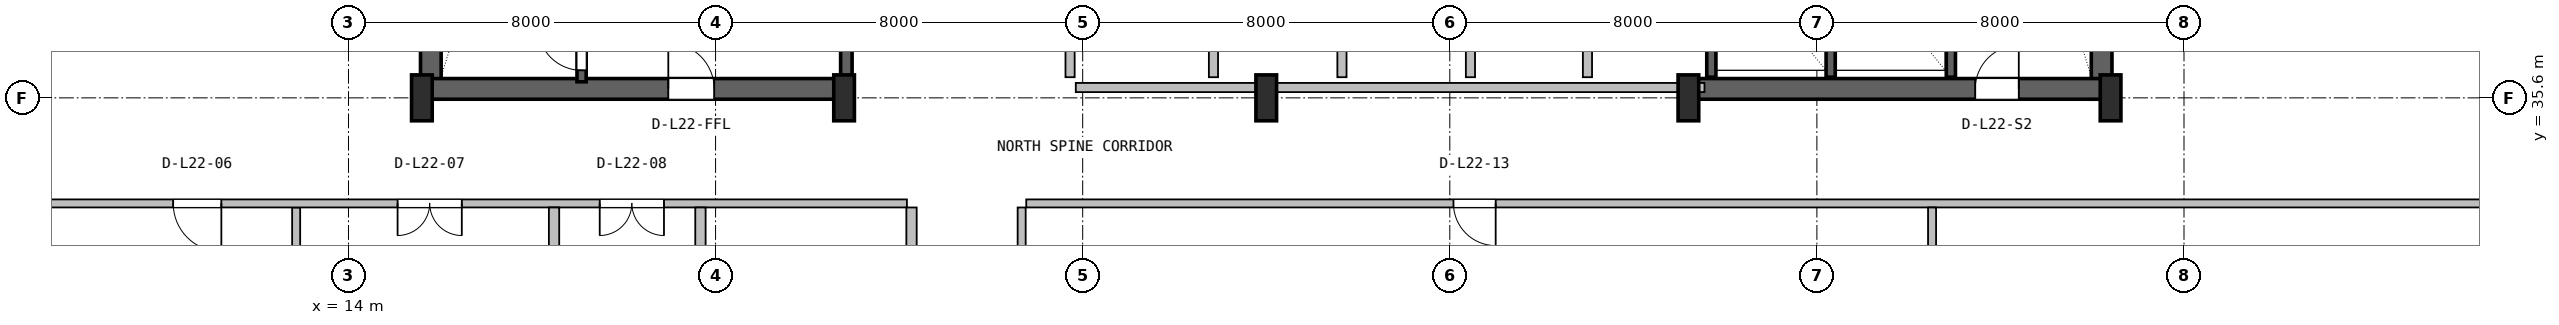
"""IFC4 building model, lengths in metres.
Left out: names, types, materials, properties, quantities, classifications, styles, units other than length and angle.
Written with IfcOpenShell. Run it as: python <this file> out.ifc"""

import sys

from ifc_helpers import new_model, si_unit, direction, frame, frame_2d, origin, origin_2d, place, context, subcontext, project, spatial, rectangle, i_section, extrude, source, transform, mapped, element, fill, save


model = new_model("IFC4")
c1 = context("Model", 3, precision=1e-05, world=origin(), true_north=direction((0.0, 1.0)))
c2 = subcontext(c1, "Body", "Model", "MODEL_VIEW")
j1 = project(units=[si_unit("LENGTHUNIT", "METRE"), si_unit("PLANEANGLEUNIT", "RADIAN")], contexts=[c1])
p1 = place(None, origin())
s1 = spatial("IfcSite", under=j1, at=p1, CompositionType="ELEMENT")
p2 = place(p1, origin())
s2 = spatial("IfcBuilding", under=s1, at=p2, CompositionType="ELEMENT")
p3 = place(p2, frame((0.0, 0.0, 94.6)))
s3 = spatial("IfcBuildingStorey", under=s2, at=p3, CompositionType="ELEMENT", Elevation=94.6)
for number, where, z_axis, x_axis in (
    (1, (15.795, 35.57, 0.0), (0.0, 0.0, 1.0), (0.0, 1.0, 0.0)),
    (2, (52.205, 35.57, 0.0), (0.0, 0.0, 1.0), (0.0, 1.0, 0.0)),
):
    element("IfcWall", number, at=place(p3, frame(where, z_axis=z_axis, x_axis=x_axis)), inside=s3, PredefinedType="SHEAR", context=c2, shape_type="SweptSolid", body=[
        extrude(rectangle(XDim=11.23, YDim=0.45, at=frame_2d((5.615, 0.0))), origin(), (0.0, 0.0, 1.0), 3.52),
    ])
p4 = place(p3, frame((15.57, 35.795, 0.0), z_axis=(0.0, 0.0, 1.0), x_axis=(1.0, 0.0, 0.0)))
e3 = element("IfcWall", 3, at=p4, inside=s3, PredefinedType="SHEAR", context=c2, shape_type="SweptSolid", body=[
    extrude(rectangle(XDim=9.23, YDim=0.45, at=frame_2d((4.615, 0.0))), origin(), (0.0, 0.0, 1.0), 3.52),
])
p5 = place(p4, frame((5.4, 0.0, 0.0)))
e4 = element("IfcOpeningElement", 4, at=p5, cuts=e3, PredefinedType="OPENING", context=c2, shape_type="SweptSolid", body=[
    extrude(rectangle(XDim=1.0, YDim=2.1, at=frame_2d((0.5, 1.05))), frame((0.0, 0.235, 0.0), z_axis=(0.0, -1.0, 0.0), x_axis=(1.0, 0.0, 0.0)), (0.0, 0.0, 1.0), 0.47),
])
p6 = place(p3, frame((43.2, 35.795, 0.0), z_axis=(0.0, 0.0, 1.0), x_axis=(1.0, 0.0, 0.0)))
e5 = element("IfcWall", 5, at=p6, inside=s3, PredefinedType="SHEAR", context=c2, shape_type="SweptSolid", body=[
    extrude(rectangle(XDim=9.23, YDim=0.45, at=frame_2d((4.615, 0.0))), origin(), (0.0, 0.0, 1.0), 3.52),
])
p7 = place(p6, frame((6.25, 0.0, 0.0)))
e6 = element("IfcOpeningElement", 6, at=p7, cuts=e5, PredefinedType="OPENING", context=c2, shape_type="SweptSolid", body=[
    extrude(rectangle(XDim=0.95, YDim=2.1, at=frame_2d((0.475, 1.05))), frame((0.0, 0.235, 0.0), z_axis=(0.0, -1.0, 0.0), x_axis=(1.0, 0.0, 0.0)), (0.0, 0.0, 1.0), 0.47),
])
m1 = source(origin(), c2, "Body", "SweptSolid", [
    extrude(i_section(OverallWidth=0.45, OverallDepth=1.0, WebThickness=0.016, FlangeThickness=0.03, FilletRadius=0.016, at=origin_2d()), origin(), (0.0, 0.0, 1.0), 3.8),
])
for number, where, z_axis, x_axis in (
    (7, (15.6, 35.6, 0.0), (0.0, 0.0, 1.0), (1.0, 0.0, 0.0)),
    (8, (24.8, 35.6, 0.0), (0.0, 0.0, 1.0), (1.0, 0.0, 0.0)),
    (9, (34.0, 35.6, 0.0), (0.0, 0.0, 1.0), (1.0, 0.0, 0.0)),
    (10, (43.2, 35.6, 0.0), (0.0, 0.0, 1.0), (1.0, 0.0, 0.0)),
    (11, (52.4, 35.6, 0.0), (0.0, 0.0, 1.0), (1.0, 0.0, 0.0)),
):
    element("IfcColumn", number, at=place(p3, frame(where, z_axis=z_axis, x_axis=x_axis)), inside=s3, PredefinedType="COLUMN", context=c2, shape_type="MappedRepresentation", body=[
        mapped(m1, transform((0.0, 0.0, 0.0), x_axis=(1.0, 0.0, 0.0), y_axis=(0.0, 1.0, 0.0), z_axis=(0.0, 0.0, 1.0), scale=1.0)),
    ])
p8 = place(p3, frame((19.08, 35.95, 0.0), z_axis=(0.0, 0.0, 1.0), x_axis=(0.0, 1.0, 0.0)))
e12 = element("IfcWall", 12, at=p8, inside=s3, PredefinedType="SHEAR", context=c2, shape_type="SweptSolid", body=[
    extrude(rectangle(XDim=9.65, YDim=0.2, at=frame_2d((4.825, 0.0))), origin(), (0.0, 0.0, 1.0), 3.52),
])
p9 = place(p8, frame((0.25, 0.0, 0.0)))
e13 = element("IfcOpeningElement", 13, at=p9, cuts=e12, PredefinedType="OPENING", context=c2, shape_type="SweptSolid", body=[
    extrude(rectangle(XDim=0.95, YDim=2.1, at=frame_2d((0.475, 1.05))), frame((0.0, 0.11, 0.0), z_axis=(0.0, -1.0, 0.0), x_axis=(1.0, 0.0, 0.0)), (0.0, 0.0, 1.0), 0.22),
])
p10 = place(p3, frame((24.85, 36.05, 0.0), z_axis=(0.0, 0.0, 1.0), x_axis=(0.0, 1.0, 0.0)))
e14 = element("IfcWall", 14, at=p10, inside=s3, PredefinedType="SHEAR", context=c2, shape_type="SweptSolid", body=[
    extrude(rectangle(XDim=10.45, YDim=0.25, at=frame_2d((5.225, 0.0))), origin(), (0.0, 0.0, 1.0), 3.52),
])
p11 = place(p3, frame((48.92, 36.05, 0.0), z_axis=(0.0, 0.0, 1.0), x_axis=(0.0, 1.0, 0.0)))
e15 = element("IfcWall", 15, at=p11, inside=s3, PredefinedType="SHEAR", context=c2, shape_type="SweptSolid", body=[
    extrude(rectangle(XDim=10.5, YDim=0.2, at=frame_2d((5.25, 0.0))), origin(), (0.0, 0.0, 1.0), 3.52),
])
for number, where, z_axis, x_axis in (
    (16, (43.7, 36.05, 0.0), (0.0, 0.0, 1.0), (0.0, 1.0, 0.0)),
    (17, (46.3, 36.05, 0.0), (0.0, 0.0, 1.0), (0.0, 1.0, 0.0)),
):
    element("IfcWall", number, at=place(p3, frame(where, z_axis=z_axis, x_axis=x_axis)), inside=s3, PredefinedType="SHEAR", context=c2, shape_type="SweptSolid", body=[
        extrude(rectangle(XDim=3.05, YDim=0.2, at=frame_2d((1.525, 0.0))), origin(), (0.0, 0.0, 1.0), 3.52),
    ])
p12 = place(p3, frame((29.85, 35.825, 0.0), z_axis=(0.0, 0.0, 1.0), x_axis=(1.0, 0.0, 0.0)))
e18 = element("IfcWall", 18, at=p12, inside=s3, PredefinedType="SOLIDWALL", context=c2, shape_type="SweptSolid", body=[
    extrude(rectangle(XDim=13.7, YDim=0.2, at=frame_2d((6.85, 0.0))), origin(), (0.0, 0.0, 1.0), 2.295),
])
for number, where, z_axis, x_axis in (
    (19, (32.85, 36.05, 0.0), (0.0, 0.0, 1.0), (0.0, 1.0, 0.0)),
    (20, (29.725, 36.05, 0.0), (0.0, 0.0, 1.0), (0.0, 1.0, 0.0)),
    (21, (35.65, 36.05, 0.0), (0.0, 0.0, 1.0), (0.0, 1.0, 0.0)),
    (22, (38.45, 36.05, 0.0), (0.0, 0.0, 1.0), (0.0, 1.0, 0.0)),
):
    element("IfcWall", number, at=place(p3, frame(where, z_axis=z_axis, x_axis=x_axis)), inside=s3, PredefinedType="PLUMBINGWALL", context=c2, shape_type="SweptSolid", body=[
        extrude(rectangle(XDim=3.1, YDim=0.2, at=frame_2d((1.55, 0.0))), origin(), (0.0, 0.0, 1.0), 3.5),
    ])
p13 = place(p3, frame((41.0, 36.05, 0.0), z_axis=(0.0, 0.0, 1.0), x_axis=(0.0, 1.0, 0.0)))
e23 = element("IfcWall", 23, at=p13, inside=s3, PredefinedType="SOLIDWALL", context=c2, shape_type="SweptSolid", body=[
    extrude(rectangle(XDim=3.1, YDim=0.2, at=frame_2d((1.55, 0.0))), origin(), (0.0, 0.0, 1.0), 3.5),
])
p14 = place(p3, frame((12.86, 4.38, 0.0), z_axis=(0.0, 0.0, 1.0), x_axis=(0.0, 1.0, 0.0)))
e24 = element("IfcWall", 24, at=p14, inside=s3, PredefinedType="PARTITIONING", context=c2, shape_type="SweptSolid", body=[
    extrude(rectangle(XDim=28.832, YDim=0.175, at=frame_2d((14.416, 0.0))), origin(), (0.0, 0.0, 1.0), 3.078),
])
p15 = place(p3, frame((4.68, 33.3, 0.0), z_axis=(0.0, 0.0, 1.0), x_axis=(1.0, 0.0, 0.0)))
e25 = element("IfcWall", 25, at=p15, inside=s3, PredefinedType="PARTITIONING", context=c2, shape_type="SweptSolid", body=[
    extrude(rectangle(XDim=21.49, YDim=0.175, at=frame_2d((10.745, 0.0))), origin(), (0.0, 0.0, 1.0), 2.8),
])
p16 = place(p15, frame((5.5, 0.0, 0.0)))
e26 = element("IfcOpeningElement", 26, at=p16, cuts=e25, PredefinedType="OPENING", context=c2, shape_type="SweptSolid", body=[
    extrude(rectangle(XDim=1.05, YDim=2.1, at=frame_2d((0.525, 1.05))), frame((0.0, 0.098, 0.0), z_axis=(0.0, -1.0, 0.0), x_axis=(1.0, 0.0, 0.0)), (0.0, 0.0, 1.0), 0.195),
])
p17 = place(p15, frame((10.39, 0.0, 0.0)))
e27 = element("IfcOpeningElement", 27, at=p17, cuts=e25, PredefinedType="OPENING", context=c2, shape_type="SweptSolid", body=[
    extrude(rectangle(XDim=1.4, YDim=2.12, at=frame_2d((0.7, 1.06))), frame((0.0, 0.098, 0.0), z_axis=(0.0, -1.0, 0.0), x_axis=(1.0, 0.0, 0.0)), (0.0, 0.0, 1.0), 0.195),
])
p18 = place(p15, frame((14.795, 0.0, 0.0)))
e28 = element("IfcOpeningElement", 28, at=p18, cuts=e25, PredefinedType="OPENING", context=c2, shape_type="SweptSolid", body=[
    extrude(rectangle(XDim=1.4, YDim=2.12, at=frame_2d((0.7, 1.06))), frame((0.0, 0.098, 0.0), z_axis=(0.0, -1.0, 0.0), x_axis=(1.0, 0.0, 0.0)), (0.0, 0.0, 1.0), 0.195),
])
for number, where, z_axis, x_axis in (
    (29, (18.48, 4.38, 0.0), (0.0, 0.0, 1.0), (0.0, 1.0, 0.0)),
    (30, (21.67, 4.38, 0.0), (0.0, 0.0, 1.0), (0.0, 1.0, 0.0)),
):
    element("IfcWall", number, at=place(p3, frame(where, z_axis=z_axis, x_axis=x_axis)), inside=s3, PredefinedType="PARTITIONING", context=c2, shape_type="SweptSolid", body=[
        extrude(rectangle(XDim=28.832, YDim=0.225, at=frame_2d((14.416, 0.0))), origin(), (0.0, 0.0, 1.0), 3.078),
    ])
p19 = place(p3, frame((26.27, 4.38, 0.0), z_axis=(0.0, 0.0, 1.0), x_axis=(0.0, 1.0, 0.0)))
e31 = element("IfcWall", 31, at=p19, inside=s3, PredefinedType="PARTITIONING", context=c2, shape_type="SweptSolid", body=[
    extrude(rectangle(XDim=28.832, YDim=0.225, at=frame_2d((14.416, 0.0))), origin(), (0.0, 0.0, 1.0), 2.8),
])
p20 = place(p19, frame((14.215, 0.0, 0.0)))
e32 = element("IfcOpeningElement", 32, at=p20, cuts=e31, PredefinedType="OPENING", context=c2, shape_type="SweptSolid", body=[
    extrude(rectangle(XDim=1.4, YDim=2.12, at=frame_2d((0.7, 1.06))), frame((0.0, 0.123, 0.0), z_axis=(0.0, -1.0, 0.0), x_axis=(1.0, 0.0, 0.0)), (0.0, 0.0, 1.0), 0.245),
])
p21 = place(p3, frame((28.77, 33.3, 0.0), z_axis=(0.0, 0.0, 1.0), x_axis=(1.0, 0.0, 0.0)))
e33 = element("IfcWall", 33, at=p21, inside=s3, PredefinedType="PARTITIONING", context=c2, shape_type="SweptSolid", body=[
    extrude(rectangle(XDim=34.55, YDim=0.175, at=frame_2d((17.275, 0.0))), origin(), (0.0, 0.0, 1.0), 2.8),
])
p22 = place(p21, frame((9.31, 0.0, 0.0)))
e34 = element("IfcOpeningElement", 34, at=p22, cuts=e33, PredefinedType="OPENING", context=c2, shape_type="SweptSolid", body=[
    extrude(rectangle(XDim=0.92, YDim=2.08, at=frame_2d((0.46, 1.04))), frame((0.0, 0.098, 0.0), z_axis=(0.0, -1.0, 0.0), x_axis=(1.0, 0.0, 0.0)), (0.0, 0.0, 1.0), 0.195),
])
p23 = place(p3, frame((48.51, 23.598, 0.0), z_axis=(0.0, 0.0, 1.0), x_axis=(0.0, 1.0, 0.0)))
e35 = element("IfcWall", 35, at=p23, inside=s3, PredefinedType="PARTITIONING", context=c2, shape_type="SweptSolid", body=[
    extrude(rectangle(XDim=9.614, YDim=0.175, at=frame_2d((4.807, 0.0))), origin(), (0.0, 0.0, 1.0), 3.192),
])
p24 = place(p3, frame((28.67, 18.207, 0.0), z_axis=(0.0, 0.0, 1.0), x_axis=(0.0, 1.0, 0.0)))
e36 = element("IfcWall", 36, at=p24, inside=s3, PredefinedType="PARTITIONING", context=c2, shape_type="SweptSolid", body=[
    extrude(rectangle(XDim=15.005, YDim=0.175, at=frame_2d((7.502, 0.0))), origin(), (0.0, 0.0, 1.0), 2.8),
])
m2 = source(origin(), c2, "Body", "SweptSolid", [
    extrude(rectangle(XDim=0.95, YDim=2.1, at=frame_2d((0.475, 1.05))), frame((0.0, 0.025, 0.0), z_axis=(0.0, -1.0, 0.0), x_axis=(1.0, 0.0, 0.0)), (0.0, 0.0, 1.0), 0.05),
])
p25 = place(p9, origin())
e37 = element("IfcDoor", 37, at=p25, inside=s3, OperationType="SINGLE_SWING_RIGHT", PredefinedType="DOOR", context=c2, shape_type="MappedRepresentation", body=[
    mapped(m2, transform((0.0, 0.0, 0.0), x_axis=(1.0, 0.0, 0.0), y_axis=(0.0, 1.0, 0.0), z_axis=(0.0, 0.0, 1.0), scale=1.0)),
])
fill(e13, e37)
m3 = source(origin(), c2, "Body", "SweptSolid", [
    extrude(rectangle(XDim=1.0, YDim=2.1, at=frame_2d((0.5, 1.05))), frame((0.0, 0.025, 0.0), z_axis=(0.0, -1.0, 0.0), x_axis=(1.0, 0.0, 0.0)), (0.0, 0.0, 1.0), 0.05),
])
p26 = place(p5, origin())
e38 = element("IfcDoor", 38, at=p26, inside=s3, OperationType="SINGLE_SWING_LEFT", PredefinedType="DOOR", context=c2, shape_type="MappedRepresentation", body=[
    mapped(m3, transform((0.0, 0.0, 0.0), x_axis=(1.0, 0.0, 0.0), y_axis=(0.0, 1.0, 0.0), z_axis=(0.0, 0.0, 1.0), scale=1.0)),
])
fill(e4, e38)
p27 = place(p7, origin())
e39 = element("IfcDoor", 39, at=p27, inside=s3, OperationType="SINGLE_SWING_RIGHT", PredefinedType="DOOR", context=c2, shape_type="MappedRepresentation", body=[
    mapped(m2, transform((0.0, 0.0, 0.0), x_axis=(1.0, 0.0, 0.0), y_axis=(0.0, 1.0, 0.0), z_axis=(0.0, 0.0, 1.0), scale=1.0)),
])
fill(e6, e39)
m4 = source(origin(), c2, "Body", "SweptSolid", [
    extrude(rectangle(XDim=1.05, YDim=2.1, at=frame_2d((0.525, 1.05))), frame((0.0, 0.025, 0.0), z_axis=(0.0, -1.0, 0.0), x_axis=(1.0, 0.0, 0.0)), (0.0, 0.0, 1.0), 0.05),
])
p28 = place(p16, frame((1.05, 0.0, 0.0), z_axis=(0.0, 0.0, 1.0), x_axis=(-1.0, 0.0, 0.0)))
e40 = element("IfcDoor", 40, at=p28, inside=s3, OperationType="SINGLE_SWING_RIGHT", PredefinedType="DOOR", context=c2, shape_type="MappedRepresentation", body=[
    mapped(m4, transform((0.0, 0.0, 0.0), x_axis=(1.0, 0.0, 0.0), y_axis=(0.0, 1.0, 0.0), z_axis=(0.0, 0.0, 1.0), scale=1.0)),
])
fill(e26, e40)
m5 = source(origin(), c2, "Body", "SweptSolid", [
    extrude(rectangle(XDim=1.4, YDim=2.12, at=frame_2d((0.7, 1.06))), frame((0.0, 0.025, 0.0), z_axis=(0.0, -1.0, 0.0), x_axis=(1.0, 0.0, 0.0)), (0.0, 0.0, 1.0), 0.05),
])
p29 = place(p17, frame((1.4, 0.0, 0.0), z_axis=(0.0, 0.0, 1.0), x_axis=(-1.0, 0.0, 0.0)))
e41 = element("IfcDoor", 41, at=p29, inside=s3, OperationType="DOUBLE_DOOR_SINGLE_SWING", PredefinedType="DOOR", context=c2, shape_type="MappedRepresentation", body=[
    mapped(m5, transform((0.0, 0.0, 0.0), x_axis=(1.0, 0.0, 0.0), y_axis=(0.0, 1.0, 0.0), z_axis=(0.0, 0.0, 1.0), scale=1.0)),
])
fill(e27, e41)
p30 = place(p18, frame((1.4, 0.0, 0.0), z_axis=(0.0, 0.0, 1.0), x_axis=(-1.0, 0.0, 0.0)))
e42 = element("IfcDoor", 42, at=p30, inside=s3, OperationType="DOUBLE_DOOR_SINGLE_SWING", PredefinedType="DOOR", context=c2, shape_type="MappedRepresentation", body=[
    mapped(m5, transform((0.0, 0.0, 0.0), x_axis=(1.0, 0.0, 0.0), y_axis=(0.0, 1.0, 0.0), z_axis=(0.0, 0.0, 1.0), scale=1.0)),
])
fill(e28, e42)
m6 = source(origin(), c2, "Body", "SweptSolid", [
    extrude(rectangle(XDim=0.92, YDim=2.08, at=frame_2d((0.46, 1.04))), frame((0.0, 0.025, 0.0), z_axis=(0.0, -1.0, 0.0), x_axis=(1.0, 0.0, 0.0)), (0.0, 0.0, 1.0), 0.05),
])
p31 = place(p22, frame((0.92, 0.0, 0.0), z_axis=(0.0, 0.0, 1.0), x_axis=(-1.0, 0.0, 0.0)))
e43 = element("IfcDoor", 43, at=p31, inside=s3, OperationType="SINGLE_SWING_RIGHT", PredefinedType="DOOR", context=c2, shape_type="MappedRepresentation", body=[
    mapped(m6, transform((0.0, 0.0, 0.0), x_axis=(1.0, 0.0, 0.0), y_axis=(0.0, 1.0, 0.0), z_axis=(0.0, 0.0, 1.0), scale=1.0)),
])
fill(e34, e43)
save(model, sys.argv[1])
